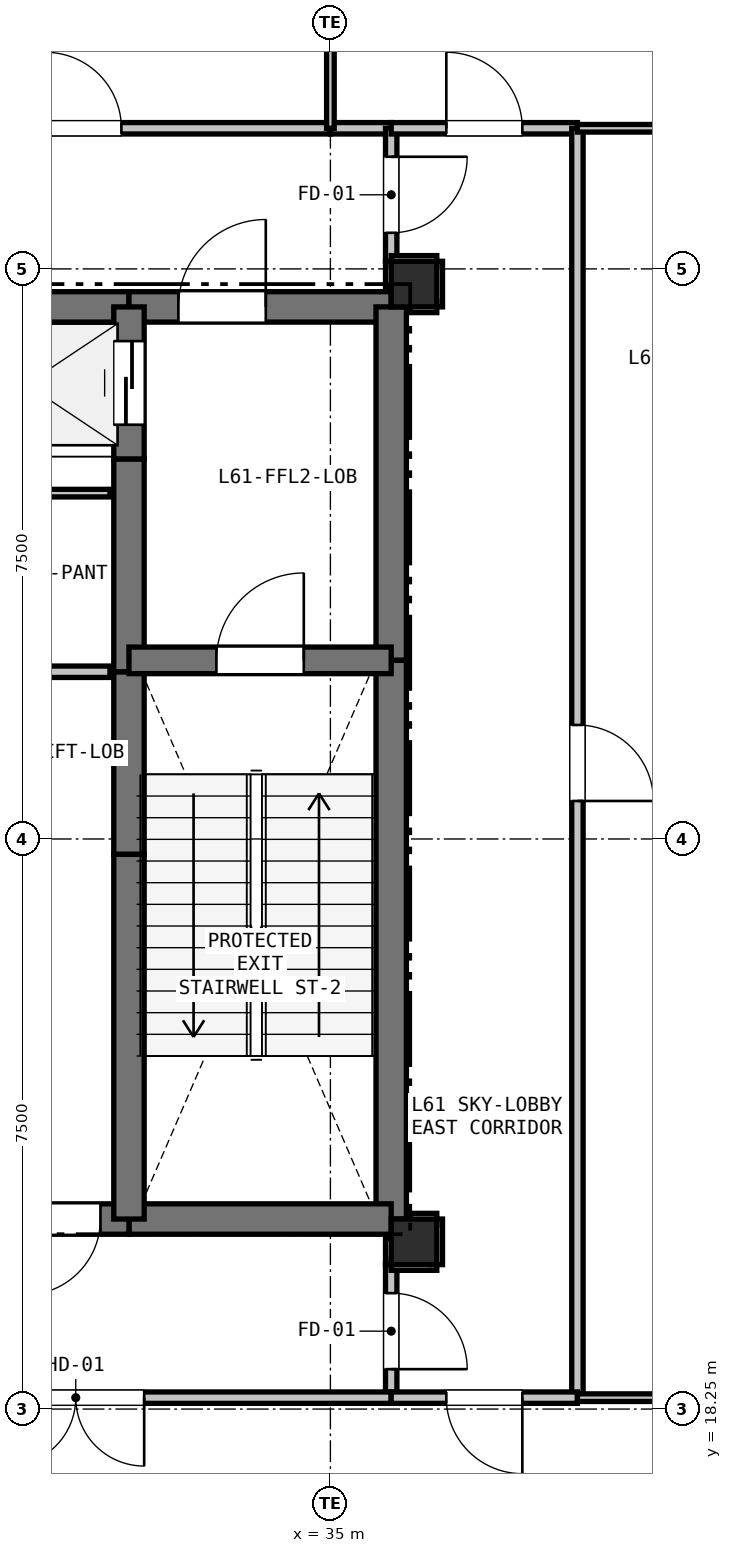
"""IFC4 building model, lengths in metres.
Left out: names, types, materials, properties, quantities, classifications, styles, units other than length and angle.
Written with IfcOpenShell. Run it as: python <this file> out.ifc"""

import sys

from ifc_helpers import new_model, si_unit, direction, frame, frame_2d, origin, origin_2d, place, context, subcontext, project, spatial, rectangle, extrude, element, fill, save


model = new_model("IFC4")
c1 = context("Model", 3, precision=1e-05, world=origin(), true_north=direction((0.0, 1.0)))
c2 = subcontext(c1, "Body", "Model", "MODEL_VIEW")
j1 = project(units=[si_unit("LENGTHUNIT", "METRE"), si_unit("PLANEANGLEUNIT", "RADIAN")], contexts=[c1])
p1 = place(None, origin())
s1 = spatial("IfcSite", under=j1, at=p1, CompositionType="ELEMENT")
p2 = place(p1, origin())
s2 = spatial("IfcBuilding", under=s1, at=p2, CompositionType="ELEMENT")
p3 = place(p2, frame((0.0, 0.0, 218.4)))
s3 = spatial("IfcBuildingStorey", under=s2, at=p3, CompositionType="ELEMENT", Elevation=218.4)
for number, where, z_axis, x_axis in (
    (1, (36.1, 33.05, 0.0), (0.0, 0.0, 1.0), (1.0, 0.0, 0.0)),
    (2, (36.1, 20.45, 0.0), (0.0, 0.0, 1.0), (1.0, 0.0, 0.0)),
):
    element("IfcColumn", number, at=place(p3, frame(where, z_axis=z_axis, x_axis=x_axis)), inside=s3, PredefinedType="COLUMN", context=c2, shape_type="SweptSolid", body=[
        extrude(rectangle(XDim=0.6, YDim=0.6, at=origin_2d()), origin(), (0.0, 0.0, 1.0), 4.8),
    ])
p4 = place(p3, frame((29.65, 32.75, 0.0), z_axis=(0.0, 0.0, 1.0), x_axis=(1.0, 0.0, 0.0)))
e3 = element("IfcWall", 3, at=p4, inside=s3, PredefinedType="SHEAR", context=c2, shape_type="SweptSolid", body=[
    extrude(rectangle(XDim=2.7, YDim=0.4, at=frame_2d((1.35, 0.0))), origin(), (0.0, 0.0, 1.0), 4.58),
])
p5 = place(p3, frame((32.35, 32.75, 0.0), z_axis=(0.0, 0.0, 1.0), x_axis=(1.0, 0.0, 0.0)))
e4 = element("IfcWall", 4, at=p5, inside=s3, PredefinedType="SHEAR", context=c2, shape_type="SweptSolid", body=[
    extrude(rectangle(XDim=3.45, YDim=0.4, at=frame_2d((1.725, 0.0))), origin(), (0.0, 0.0, 1.0), 4.58),
])
p6 = place(p5, frame((0.65, 0.0, 0.0)))
e5 = element("IfcOpeningElement", 5, at=p6, cuts=e4, PredefinedType="OPENING", context=c2, shape_type="SweptSolid", body=[
    extrude(rectangle(XDim=1.15, YDim=2.15, at=frame_2d((0.575, 1.075))), frame((0.0, 0.21, 0.0), z_axis=(0.0, -1.0, 0.0), x_axis=(1.0, 0.0, 0.0)), (0.0, 0.0, 1.0), 0.42),
])
p7 = place(p3, frame((35.8, 32.75, 0.0), z_axis=(0.0, 0.0, 1.0), x_axis=(0.0, -1.0, 0.0)))
e6 = element("IfcWall", 6, at=p7, inside=s3, PredefinedType="SHEAR", context=c2, shape_type="SweptSolid", body=[
    extrude(rectangle(XDim=4.65, YDim=0.4, at=frame_2d((2.325, 0.0))), origin(), (0.0, 0.0, 1.0), 4.58),
])
p8 = place(p3, frame((35.8, 28.1, 0.0), z_axis=(0.0, 0.0, 1.0), x_axis=(0.0, -1.0, 0.0)))
e7 = element("IfcWall", 7, at=p8, inside=s3, PredefinedType="SHEAR", context=c2, shape_type="SweptSolid", body=[
    extrude(rectangle(XDim=7.35, YDim=0.4, at=frame_2d((3.675, 0.0))), origin(), (0.0, 0.0, 1.0), 4.58),
])
p9 = place(p3, frame((35.8, 20.75, 0.0), z_axis=(0.0, 0.0, 1.0), x_axis=(-1.0, 0.0, 0.0)))
e8 = element("IfcWall", 8, at=p9, inside=s3, PredefinedType="SHEAR", context=c2, shape_type="SweptSolid", body=[
    extrude(rectangle(XDim=3.45, YDim=0.4, at=frame_2d((1.725, 0.0))), origin(), (0.0, 0.0, 1.0), 4.58),
])
p10 = place(p3, frame((32.35, 20.75, 0.0), z_axis=(0.0, 0.0, 1.0), x_axis=(-1.0, 0.0, 0.0)))
e9 = element("IfcWall", 9, at=p10, inside=s3, PredefinedType="SHEAR", context=c2, shape_type="SweptSolid", body=[
    extrude(rectangle(XDim=1.75, YDim=0.4, at=frame_2d((0.875, 0.0))), origin(), (0.0, 0.0, 1.0), 4.58),
])
p11 = place(p10, frame((0.375, 0.0, 0.0)))
e10 = element("IfcOpeningElement", 10, at=p11, cuts=e9, PredefinedType="OPENING", context=c2, shape_type="SweptSolid", body=[
    extrude(rectangle(XDim=1.0, YDim=2.15, at=frame_2d((0.5, 1.075))), frame((0.0, 0.21, 0.0), z_axis=(0.0, -1.0, 0.0), x_axis=(1.0, 0.0, 0.0)), (0.0, 0.0, 1.0), 0.42),
])
p12 = place(p3, frame((32.35, 20.75, 0.0), z_axis=(0.0, 0.0, 1.0), x_axis=(0.0, 1.0, 0.0)))
e11 = element("IfcWall", 11, at=p12, inside=s3, PredefinedType="SHEAR", context=c2, shape_type="SweptSolid", body=[
    extrude(rectangle(XDim=4.8, YDim=0.4, at=frame_2d((2.4, 0.0))), origin(), (0.0, 0.0, 1.0), 4.58),
])
p13 = place(p3, frame((32.35, 25.55, 0.0), z_axis=(0.0, 0.0, 1.0), x_axis=(0.0, 1.0, 0.0)))
e12 = element("IfcWall", 12, at=p13, inside=s3, PredefinedType="SHEAR", context=c2, shape_type="SweptSolid", body=[
    extrude(rectangle(XDim=2.4, YDim=0.4, at=frame_2d((1.2, 0.0))), origin(), (0.0, 0.0, 1.0), 4.58),
])
p14 = place(p3, frame((32.35, 27.95, 0.0), z_axis=(0.0, 0.0, 1.0), x_axis=(0.0, 1.0, 0.0)))
e13 = element("IfcWall", 13, at=p14, inside=s3, PredefinedType="SHEAR", context=c2, shape_type="SweptSolid", body=[
    extrude(rectangle(XDim=2.8, YDim=0.4, at=frame_2d((1.4, 0.0))), origin(), (0.0, 0.0, 1.0), 4.58),
])
p15 = place(p3, frame((32.35, 30.75, 0.0), z_axis=(0.0, 0.0, 1.0), x_axis=(0.0, 1.0, 0.0)))
e14 = element("IfcWall", 14, at=p15, inside=s3, PredefinedType="SHEAR", context=c2, shape_type="SweptSolid", body=[
    extrude(rectangle(XDim=2.0, YDim=0.4, at=frame_2d((1.0, 0.0))), origin(), (0.0, 0.0, 1.0), 4.58),
])
p16 = place(p15, frame((0.45, 0.0, 0.0)))
e15 = element("IfcOpeningElement", 15, at=p16, cuts=e14, PredefinedType="OPENING", context=c2, shape_type="SweptSolid", body=[
    extrude(rectangle(XDim=1.1, YDim=2.15, at=frame_2d((0.55, 1.075))), frame((0.0, 0.21, 0.0), z_axis=(0.0, -1.0, 0.0), x_axis=(1.0, 0.0, 0.0)), (0.0, 0.0, 1.0), 0.42),
])
p17 = place(p3, frame((32.35, 28.1, 0.0), z_axis=(0.0, 0.0, 1.0), x_axis=(1.0, 0.0, 0.0)))
e16 = element("IfcWall", 16, at=p17, inside=s3, PredefinedType="SHEAR", context=c2, shape_type="SweptSolid", body=[
    extrude(rectangle(XDim=3.45, YDim=0.35, at=frame_2d((1.725, 0.0))), origin(), (0.0, 0.0, 1.0), 4.58),
])
p18 = place(p17, frame((1.15, 0.0, 0.0)))
e17 = element("IfcOpeningElement", 17, at=p18, cuts=e16, PredefinedType="OPENING", context=c2, shape_type="SweptSolid", body=[
    extrude(rectangle(XDim=1.15, YDim=2.15, at=frame_2d((0.575, 1.075))), frame((0.0, 0.185, 0.0), z_axis=(0.0, -1.0, 0.0), x_axis=(1.0, 0.0, 0.0)), (0.0, 0.0, 1.0), 0.37),
])
p19 = place(p3, frame((32.1, 30.3, 0.0), z_axis=(0.0, 0.0, 1.0), x_axis=(-1.0, 0.0, 0.0)))
e18 = element("IfcWall", 18, at=p19, inside=s3, PredefinedType="PARTITIONING", context=c2, shape_type="SweptSolid", body=[
    extrude(rectangle(XDim=2.45, YDim=0.1, at=frame_2d((1.225, 0.0))), origin(), (0.0, 0.0, 1.0), 4.58),
])
p20 = place(p3, frame((27.4, 27.95, 0.0), z_axis=(0.0, 0.0, 1.0), x_axis=(1.0, 0.0, 0.0)))
e19 = element("IfcWall", 19, at=p20, inside=s3, PredefinedType="PARTITIONING", context=c2, shape_type="SweptSolid", body=[
    extrude(rectangle(XDim=4.7, YDim=0.15, at=frame_2d((2.35, 0.0))), origin(), (0.0, 0.0, 1.0), 4.58),
])
p21 = place(p20, frame((1.85, 0.0, 0.0)))
e20 = element("IfcOpeningElement", 20, at=p21, cuts=e19, PredefinedType="OPENING", context=c2, shape_type="SweptSolid", body=[
    extrude(rectangle(XDim=1.0, YDim=2.15, at=frame_2d((0.5, 1.075))), frame((0.0, 0.085, 0.0), z_axis=(0.0, -1.0, 0.0), x_axis=(1.0, 0.0, 0.0)), (0.0, 0.0, 1.0), 0.17),
])
p22 = place(p3, frame((28.5, 35.1, 0.0), z_axis=(0.0, 0.0, 1.0), x_axis=(1.0, 0.0, 0.0)))
e21 = element("IfcWall", 21, at=p22, inside=s3, PredefinedType="PARTITIONING", context=c2, shape_type="SweptSolid", body=[
    extrude(rectangle(XDim=6.5, YDim=0.15, at=frame_2d((3.25, 0.0))), origin(), (0.0, 0.0, 1.0), 3.215),
])
p23 = place(p22, frame((2.75, 0.0, 0.0)))
e22 = element("IfcOpeningElement", 22, at=p23, cuts=e21, PredefinedType="OPENING", context=c2, shape_type="SweptSolid", body=[
    extrude(rectangle(XDim=1.0, YDim=2.15, at=frame_2d((0.5, 1.075))), frame((0.0, 0.085, 0.0), z_axis=(0.0, -1.0, 0.0), x_axis=(1.0, 0.0, 0.0)), (0.0, 0.0, 1.0), 0.17),
])
p24 = place(p3, frame((35.0, 35.1, 0.0), z_axis=(0.0, 0.0, 1.0), x_axis=(1.0, 0.0, 0.0)))
e23 = element("IfcWall", 23, at=p24, inside=s3, PredefinedType="PARTITIONING", context=c2, shape_type="SweptSolid", body=[
    extrude(rectangle(XDim=0.8, YDim=0.15, at=frame_2d((0.4, 0.0))), origin(), (0.0, 0.0, 1.0), 3.215),
])
p25 = place(p3, frame((35.8, 35.1, 0.0), z_axis=(0.0, 0.0, 1.0), x_axis=(0.0, -1.0, 0.0)))
e24 = element("IfcWall", 24, at=p25, inside=s3, PredefinedType="PARTITIONING", context=c2, shape_type="SweptSolid", body=[
    extrude(rectangle(XDim=1.75, YDim=0.15, at=frame_2d((0.875, 0.0))), origin(), (0.0, 0.0, 1.0), 3.215),
])
p26 = place(p25, frame((0.375, 0.0, 0.0)))
e25 = element("IfcOpeningElement", 25, at=p26, cuts=e24, PredefinedType="OPENING", context=c2, shape_type="SweptSolid", body=[
    extrude(rectangle(XDim=1.0, YDim=2.15, at=frame_2d((0.5, 1.075))), frame((0.0, 0.085, 0.0), z_axis=(0.0, -1.0, 0.0), x_axis=(1.0, 0.0, 0.0)), (0.0, 0.0, 1.0), 0.17),
])
p27 = place(p3, frame((35.8, 33.35, 0.0), z_axis=(0.0, 0.0, 1.0), x_axis=(0.0, -1.0, 0.0)))
e26 = element("IfcWall", 26, at=p27, inside=s3, PredefinedType="PARTITIONING", context=c2, shape_type="SweptSolid", body=[
    extrude(rectangle(XDim=0.35, YDim=0.15, at=frame_2d((0.175, 0.0))), origin(), (0.0, 0.0, 1.0), 3.215),
])
p28 = place(p3, frame((35.8, 20.5, 0.0), z_axis=(0.0, 0.0, 1.0), x_axis=(0.0, -1.0, 0.0)))
e27 = element("IfcWall", 27, at=p28, inside=s3, PredefinedType="PARTITIONING", context=c2, shape_type="SweptSolid", body=[
    extrude(rectangle(XDim=0.35, YDim=0.15, at=frame_2d((0.175, 0.0))), origin(), (0.0, 0.0, 1.0), 4.105),
])
p29 = place(p3, frame((35.8, 20.15, 0.0), z_axis=(0.0, 0.0, 1.0), x_axis=(0.0, -1.0, 0.0)))
e28 = element("IfcWall", 28, at=p29, inside=s3, PredefinedType="PARTITIONING", context=c2, shape_type="SweptSolid", body=[
    extrude(rectangle(XDim=1.75, YDim=0.15, at=frame_2d((0.875, 0.0))), origin(), (0.0, 0.0, 1.0), 3.215),
])
p30 = place(p29, frame((0.375, 0.0, 0.0)))
e29 = element("IfcOpeningElement", 29, at=p30, cuts=e28, PredefinedType="OPENING", context=c2, shape_type="SweptSolid", body=[
    extrude(rectangle(XDim=1.0, YDim=2.15, at=frame_2d((0.5, 1.075))), frame((0.0, 0.085, 0.0), z_axis=(0.0, -1.0, 0.0), x_axis=(1.0, 0.0, 0.0)), (0.0, 0.0, 1.0), 0.17),
])
p31 = place(p3, frame((35.8, 18.4, 0.0), z_axis=(0.0, 0.0, 1.0), x_axis=(-1.0, 0.0, 0.0)))
e30 = element("IfcWall", 30, at=p31, inside=s3, PredefinedType="PARTITIONING", context=c2, shape_type="SweptSolid", body=[
    extrude(rectangle(XDim=8.3, YDim=0.15, at=frame_2d((4.15, 0.0))), origin(), (0.0, 0.0, 1.0), 3.215),
])
p32 = place(p31, frame((3.25, 0.0, 0.0)))
e31 = element("IfcOpeningElement", 31, at=p32, cuts=e30, PredefinedType="OPENING", context=c2, shape_type="SweptSolid", body=[
    extrude(rectangle(XDim=1.8, YDim=2.2, at=frame_2d((0.9, 1.1))), frame((0.0, 0.085, 0.0), z_axis=(0.0, -1.0, 0.0), x_axis=(1.0, 0.0, 0.0)), (0.0, 0.0, 1.0), 0.17),
])
p33 = place(p3, frame((36.4, 32.75, 0.0), z_axis=(0.0, 0.0, 1.0), x_axis=(0.0, 1.0, 0.0)))
e32 = element("IfcWall", 32, at=p33, inside=s3, PredefinedType="PARTITIONING", context=c2, shape_type="SweptSolid", body=[
    extrude(rectangle(XDim=0.6, YDim=0.15, at=frame_2d((0.3, 0.0))), origin(), (0.0, 0.0, 1.0), 3.215),
])
p34 = place(p3, frame((36.4, 33.35, 0.0), z_axis=(0.0, 0.0, 1.0), x_axis=(-1.0, 0.0, 0.0)))
e33 = element("IfcWall", 33, at=p34, inside=s3, PredefinedType="PARTITIONING", context=c2, shape_type="SweptSolid", body=[
    extrude(rectangle(XDim=0.6, YDim=0.15, at=frame_2d((0.3, 0.0))), origin(), (0.0, 0.0, 1.0), 3.215),
])
p35 = place(p3, frame((35.8, 35.1, 0.0), z_axis=(0.0, 0.0, 1.0), x_axis=(1.0, 0.0, 0.0)))
e34 = element("IfcWall", 34, at=p35, inside=s3, PredefinedType="PARTITIONING", context=c2, shape_type="SweptSolid", body=[
    extrude(rectangle(XDim=2.45, YDim=0.15, at=frame_2d((1.225, 0.0))), origin(), (0.0, 0.0, 1.0), 3.215),
])
p36 = place(p35, frame((0.725, 0.0, 0.0)))
e35 = element("IfcOpeningElement", 35, at=p36, cuts=e34, PredefinedType="OPENING", context=c2, shape_type="SweptSolid", body=[
    extrude(rectangle(XDim=1.0, YDim=2.15, at=frame_2d((0.5, 1.075))), frame((0.0, 0.085, 0.0), z_axis=(0.0, -1.0, 0.0), x_axis=(1.0, 0.0, 0.0)), (0.0, 0.0, 1.0), 0.17),
])
p37 = place(p3, frame((38.25, 35.1, 0.0), z_axis=(0.0, 0.0, 1.0), x_axis=(0.0, -1.0, 0.0)))
e36 = element("IfcWall", 36, at=p37, inside=s3, PredefinedType="PARTITIONING", context=c2, shape_type="SweptSolid", body=[
    extrude(rectangle(XDim=16.7, YDim=0.15, at=frame_2d((8.35, 0.0))), origin(), (0.0, 0.0, 1.0), 3.215),
])
p38 = place(p37, frame((7.85, 0.0, 0.0)))
e37 = element("IfcOpeningElement", 37, at=p38, cuts=e36, PredefinedType="OPENING", context=c2, shape_type="SweptSolid", body=[
    extrude(rectangle(XDim=1.0, YDim=2.15, at=frame_2d((0.5, 1.075))), frame((0.0, 0.085, 0.0), z_axis=(0.0, -1.0, 0.0), x_axis=(1.0, 0.0, 0.0)), (0.0, 0.0, 1.0), 0.17),
])
p39 = place(p3, frame((38.25, 18.4, 0.0), z_axis=(0.0, 0.0, 1.0), x_axis=(-1.0, 0.0, 0.0)))
e38 = element("IfcWall", 38, at=p39, inside=s3, PredefinedType="PARTITIONING", context=c2, shape_type="SweptSolid", body=[
    extrude(rectangle(XDim=2.45, YDim=0.15, at=frame_2d((1.225, 0.0))), origin(), (0.0, 0.0, 1.0), 3.215),
])
p40 = place(p39, frame((0.725, 0.0, 0.0)))
e39 = element("IfcOpeningElement", 39, at=p40, cuts=e38, PredefinedType="OPENING", context=c2, shape_type="SweptSolid", body=[
    extrude(rectangle(XDim=1.0, YDim=2.15, at=frame_2d((0.5, 1.075))), frame((0.0, 0.085, 0.0), z_axis=(0.0, -1.0, 0.0), x_axis=(1.0, 0.0, 0.0)), (0.0, 0.0, 1.0), 0.17),
])
p41 = place(p3, frame((35.8, 20.15, 0.0), z_axis=(0.0, 0.0, 1.0), x_axis=(1.0, 0.0, 0.0)))
e40 = element("IfcWall", 40, at=p41, inside=s3, PredefinedType="PARTITIONING", context=c2, shape_type="SweptSolid", body=[
    extrude(rectangle(XDim=0.6, YDim=0.15, at=frame_2d((0.3, 0.0))), origin(), (0.0, 0.0, 1.0), 4.58),
])
p42 = place(p3, frame((36.4, 20.15, 0.0), z_axis=(0.0, 0.0, 1.0), x_axis=(0.0, 1.0, 0.0)))
e41 = element("IfcWall", 41, at=p42, inside=s3, PredefinedType="PARTITIONING", context=c2, shape_type="SweptSolid", body=[
    extrude(rectangle(XDim=0.6, YDim=0.15, at=frame_2d((0.3, 0.0))), origin(), (0.0, 0.0, 1.0), 4.58),
])
for number, where, z_axis, x_axis in (
    (42, (36.4, 20.75, 0.0), (0.0, 0.0, 1.0), (-1.0, 0.0, 0.0)),
    (43, (36.05, 32.75, 0.0), (0.0, 0.0, 1.0), (1.0, 0.0, 0.0)),
):
    element("IfcWall", number, at=place(p3, frame(where, z_axis=z_axis, x_axis=x_axis)), inside=s3, PredefinedType="PARTITIONING", context=c2, shape_type="SweptSolid", body=[
        extrude(rectangle(XDim=0.35, YDim=0.15, at=frame_2d((0.175, 0.0))), origin(), (0.0, 0.0, 1.0), 4.105),
    ])
p43 = place(p3, frame((35.0, 39.35, 0.0), z_axis=(0.0, 0.0, 1.0), x_axis=(0.0, -1.0, 0.0)))
e44 = element("IfcWall", 44, at=p43, inside=s3, PredefinedType="PARTITIONING", context=c2, shape_type="SweptSolid", body=[
    extrude(rectangle(XDim=4.25, YDim=0.1, at=frame_2d((2.125, 0.0))), origin(), (0.0, 0.0, 1.0), 3.215),
])
for number, where, z_axis, x_axis in (
    (45, (40.452, 35.1, 0.0), (0.0, 0.0, 1.0), (-1.0, 0.0, 0.0)),
    (46, (40.452, 18.4, 0.0), (0.0, 0.0, 1.0), (-1.0, 0.0, 0.0)),
):
    element("IfcWall", number, at=place(p3, frame(where, z_axis=z_axis, x_axis=x_axis)), inside=s3, PredefinedType="PARTITIONING", context=c2, shape_type="SweptSolid", body=[
        extrude(rectangle(XDim=2.202, YDim=0.1, at=frame_2d((1.101, 0.0))), origin(), (0.0, 0.0, 1.0), 2.365),
    ])
p44 = place(p11, origin())
e47 = element("IfcDoor", 47, at=p44, inside=s3, OperationType="SINGLE_SWING_RIGHT", PredefinedType="DOOR", context=c2, shape_type="SweptSolid", body=[
    extrude(rectangle(XDim=1.0, YDim=2.15, at=frame_2d((0.5, 1.075))), frame((0.0, 0.025, 0.0), z_axis=(0.0, -1.0, 0.0), x_axis=(1.0, 0.0, 0.0)), (0.0, 0.0, 1.0), 0.05),
])
fill(e10, e47)
p45 = place(p16, origin())
e48 = element("IfcDoor", 48, at=p45, inside=s3, OperationType="SLIDING_TO_LEFT", PredefinedType="DOOR", context=c2, shape_type="SweptSolid", body=[
    extrude(rectangle(XDim=1.1, YDim=2.15, at=frame_2d((0.55, 1.075))), frame((0.0, 0.025, 0.0), z_axis=(0.0, -1.0, 0.0), x_axis=(1.0, 0.0, 0.0)), (0.0, 0.0, 1.0), 0.05),
])
fill(e15, e48)
p46 = place(p18, origin())
e49 = element("IfcDoor", 49, at=p46, inside=s3, OperationType="SINGLE_SWING_RIGHT", PredefinedType="DOOR", context=c2, shape_type="SweptSolid", body=[
    extrude(rectangle(XDim=1.15, YDim=2.15, at=frame_2d((0.575, 1.075))), frame((0.0, 0.025, 0.0), z_axis=(0.0, -1.0, 0.0), x_axis=(1.0, 0.0, 0.0)), (0.0, 0.0, 1.0), 0.05),
])
fill(e17, e49)
p47 = place(p6, origin())
e50 = element("IfcDoor", 50, at=p47, inside=s3, OperationType="SINGLE_SWING_RIGHT", PredefinedType="DOOR", context=c2, shape_type="SweptSolid", body=[
    extrude(rectangle(XDim=1.15, YDim=2.15, at=frame_2d((0.575, 1.075))), frame((0.0, 0.025, 0.0), z_axis=(0.0, -1.0, 0.0), x_axis=(1.0, 0.0, 0.0)), (0.0, 0.0, 1.0), 0.05),
])
fill(e5, e50)
p48 = place(p26, origin())
e51 = element("IfcDoor", 51, at=p48, inside=s3, OperationType="SINGLE_SWING_LEFT", PredefinedType="DOOR", context=c2, shape_type="SweptSolid", body=[
    extrude(rectangle(XDim=1.0, YDim=2.15, at=frame_2d((0.5, 1.075))), frame((0.0, 0.025, 0.0), z_axis=(0.0, -1.0, 0.0), x_axis=(1.0, 0.0, 0.0)), (0.0, 0.0, 1.0), 0.05),
])
fill(e25, e51)
p49 = place(p30, origin())
e52 = element("IfcDoor", 52, at=p49, inside=s3, OperationType="SINGLE_SWING_RIGHT", PredefinedType="DOOR", context=c2, shape_type="SweptSolid", body=[
    extrude(rectangle(XDim=1.0, YDim=2.15, at=frame_2d((0.5, 1.075))), frame((0.0, 0.025, 0.0), z_axis=(0.0, -1.0, 0.0), x_axis=(1.0, 0.0, 0.0)), (0.0, 0.0, 1.0), 0.05),
])
fill(e29, e52)
p50 = place(p23, origin())
e53 = element("IfcDoor", 53, at=p50, inside=s3, OperationType="SINGLE_SWING_LEFT", PredefinedType="DOOR", context=c2, shape_type="SweptSolid", body=[
    extrude(rectangle(XDim=1.0, YDim=2.15, at=frame_2d((0.5, 1.075))), frame((0.0, 0.025, 0.0), z_axis=(0.0, -1.0, 0.0), x_axis=(1.0, 0.0, 0.0)), (0.0, 0.0, 1.0), 0.05),
])
fill(e22, e53)
p51 = place(p32, origin())
e54 = element("IfcDoor", 54, at=p51, inside=s3, OperationType="DOUBLE_DOOR_SINGLE_SWING", PredefinedType="DOOR", context=c2, shape_type="SweptSolid", body=[
    extrude(rectangle(XDim=1.8, YDim=2.2, at=frame_2d((0.9, 1.1))), frame((0.0, 0.025, 0.0), z_axis=(0.0, -1.0, 0.0), x_axis=(1.0, 0.0, 0.0)), (0.0, 0.0, 1.0), 0.05),
])
fill(e31, e54)
p52 = place(p36, origin())
e55 = element("IfcDoor", 55, at=p52, inside=s3, OperationType="SINGLE_SWING_LEFT", PredefinedType="DOOR", context=c2, shape_type="SweptSolid", body=[
    extrude(rectangle(XDim=1.0, YDim=2.15, at=frame_2d((0.5, 1.075))), frame((0.0, 0.025, 0.0), z_axis=(0.0, -1.0, 0.0), x_axis=(1.0, 0.0, 0.0)), (0.0, 0.0, 1.0), 0.05),
])
fill(e35, e55)
p53 = place(p38, origin())
e56 = element("IfcDoor", 56, at=p53, inside=s3, OperationType="SINGLE_SWING_RIGHT", PredefinedType="DOOR", context=c2, shape_type="SweptSolid", body=[
    extrude(rectangle(XDim=1.0, YDim=2.15, at=frame_2d((0.5, 1.075))), frame((0.0, 0.025, 0.0), z_axis=(0.0, -1.0, 0.0), x_axis=(1.0, 0.0, 0.0)), (0.0, 0.0, 1.0), 0.05),
])
fill(e37, e56)
p54 = place(p40, origin())
e57 = element("IfcDoor", 57, at=p54, inside=s3, OperationType="SINGLE_SWING_LEFT", PredefinedType="DOOR", context=c2, shape_type="SweptSolid", body=[
    extrude(rectangle(XDim=1.0, YDim=2.15, at=frame_2d((0.5, 1.075))), frame((0.0, 0.025, 0.0), z_axis=(0.0, -1.0, 0.0), x_axis=(1.0, 0.0, 0.0)), (0.0, 0.0, 1.0), 0.05),
])
fill(e39, e57)
save(model, sys.argv[1])
